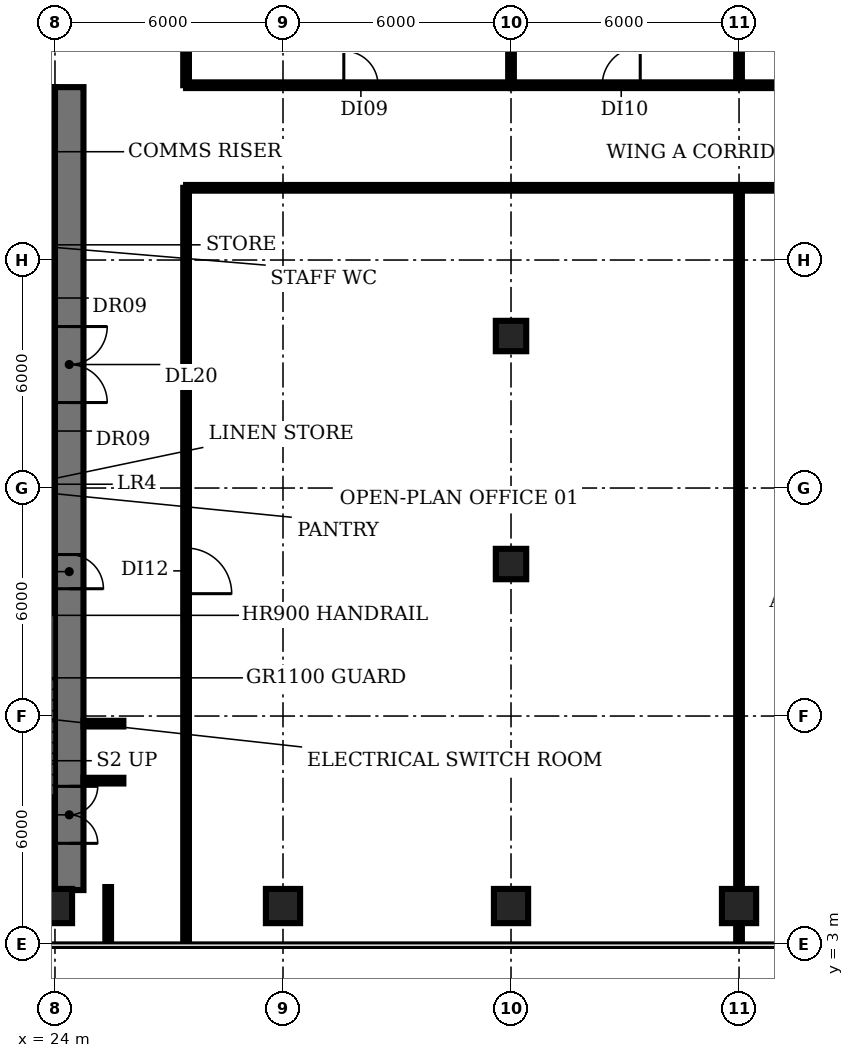
"""IFC4 building model, lengths in metres.
Left out: names, types, materials, properties, quantities, classifications, styles, units other than length and angle.
Written with IfcOpenShell. Run it as: python <this file> out.ifc"""

import sys

from ifc_helpers import new_model, si_unit, direction, frame, frame_2d, origin, origin_2d, place, context, subcontext, project, spatial, rectangle, extrude, element, fill, save


model = new_model("IFC4")
c1 = context("Model", 3, precision=1e-05, world=origin(), true_north=direction((0.0, 1.0)))
c2 = subcontext(c1, "Body", "Model", "MODEL_VIEW")
j1 = project(units=[si_unit("LENGTHUNIT", "METRE"), si_unit("PLANEANGLEUNIT", "RADIAN")], contexts=[c1])
p1 = place(None, origin())
s1 = spatial("IfcSite", under=j1, at=p1, CompositionType="ELEMENT")
p2 = place(p1, origin())
s2 = spatial("IfcBuilding", under=s1, at=p2, CompositionType="ELEMENT")
p3 = place(p2, frame((0.0, 0.0, 100.4)))
s3 = spatial("IfcBuildingStorey", under=s2, at=p3, CompositionType="ELEMENT", Elevation=100.4)
for number, where, z_axis, x_axis in (
    (1, (24.0, 4.0, 0.0), (0.0, 0.0, 1.0), (1.0, 0.0, 0.0)),
    (2, (30.0, 4.0, 0.0), (0.0, 0.0, 1.0), (1.0, 0.0, 0.0)),
    (3, (36.0, 4.0, 0.0), (0.0, 0.0, 1.0), (1.0, 0.0, 0.0)),
):
    element("IfcColumn", number, at=place(p3, frame(where, z_axis=z_axis, x_axis=x_axis)), inside=s3, PredefinedType="COLUMN", context=c2, shape_type="SweptSolid", body=[
        extrude(rectangle(XDim=0.9, YDim=0.9, at=origin_2d()), origin(), (0.0, 0.0, 1.0), 3.85),
    ])
for number, where, z_axis, x_axis in (
    (4, (36.0, 13.0, 0.0), (0.0, 0.0, 1.0), (1.0, 0.0, 0.0)),
    (5, (36.0, 19.0, 0.0), (0.0, 0.0, 1.0), (1.0, 0.0, 0.0)),
):
    element("IfcColumn", number, at=place(p3, frame(where, z_axis=z_axis, x_axis=x_axis)), inside=s3, PredefinedType="COLUMN", context=c2, shape_type="SweptSolid", body=[
        extrude(rectangle(XDim=0.8, YDim=0.8, at=origin_2d()), origin(), (0.0, 0.0, 1.0), 3.85),
    ])
p4 = place(p3, frame((42.0, 4.0, 0.0), z_axis=(0.0, 0.0, 1.0), x_axis=(1.0, 0.0, 0.0)))
e6 = element("IfcColumn", 6, at=p4, inside=s3, PredefinedType="COLUMN", context=c2, shape_type="SweptSolid", body=[
    extrude(rectangle(XDim=0.9, YDim=0.9, at=origin_2d()), origin(), (0.0, 0.0, 1.0), 3.85),
])
p5 = place(p3, frame((20.85, 11.825, 0.0), z_axis=(0.0, 0.0, 1.0), x_axis=(1.0, 0.0, 0.0)))
e7 = element("IfcWall", 7, at=p5, inside=s3, PredefinedType="SHEAR", context=c2, shape_type="SweptSolid", body=[
    extrude(rectangle(XDim=3.15, YDim=0.25, at=frame_2d((1.575, 0.0))), origin(), (0.0, 0.0, 1.0), 3.85),
])
p6 = place(p3, frame((16.6, 13.7, 0.0), z_axis=(0.0, 0.0, 1.0), x_axis=(1.0, 0.0, 0.0)))
e8 = element("IfcWall", 8, at=p6, inside=s3, PredefinedType="PARTITIONING", context=c2, shape_type="SweptSolid", body=[
    extrude(rectangle(XDim=7.4, YDim=0.225, at=frame_2d((3.7, 0.0))), origin(), (0.0, 0.0, 1.0), 3.85),
])
p7 = place(p3, frame((9.4, 16.5, 0.0), z_axis=(0.0, 0.0, 1.0), x_axis=(1.0, 0.0, 0.0)))
e9 = element("IfcWall", 9, at=p7, inside=s3, PredefinedType="PARTITIONING", context=c2, shape_type="SweptSolid", body=[
    extrude(rectangle(XDim=14.6, YDim=0.225, at=frame_2d((7.3, 0.0))), origin(), (0.0, 0.0, 1.0), 3.85),
])
p8 = place(p7, frame((0.75, 0.0, 0.0)))
e10 = element("IfcOpeningElement", 10, at=p8, cuts=e9, PredefinedType="OPENING", context=c2, shape_type="SweptSolid", body=[
    extrude(rectangle(XDim=1.1, YDim=2.1, at=frame_2d((0.55, 1.05))), frame((0.0, 0.123, 0.0), z_axis=(0.0, -1.0, 0.0), x_axis=(1.0, 0.0, 0.0)), (0.0, 0.0, 1.0), 0.245),
])
p9 = place(p7, frame((3.55, 0.0, 0.0)))
e11 = element("IfcOpeningElement", 11, at=p9, cuts=e9, PredefinedType="OPENING", context=c2, shape_type="SweptSolid", body=[
    extrude(rectangle(XDim=1.1, YDim=2.1, at=frame_2d((0.55, 1.05))), frame((0.0, 0.123, 0.0), z_axis=(0.0, -1.0, 0.0), x_axis=(1.0, 0.0, 0.0)), (0.0, 0.0, 1.0), 0.245),
])
p10 = place(p7, frame((6.35, 0.0, 0.0)))
e12 = element("IfcOpeningElement", 12, at=p10, cuts=e9, PredefinedType="OPENING", context=c2, shape_type="SweptSolid", body=[
    extrude(rectangle(XDim=1.1, YDim=2.1, at=frame_2d((0.55, 1.05))), frame((0.0, 0.123, 0.0), z_axis=(0.0, -1.0, 0.0), x_axis=(1.0, 0.0, 0.0)), (0.0, 0.0, 1.0), 0.245),
])
p11 = place(p7, frame((9.15, 0.0, 0.0)))
e13 = element("IfcOpeningElement", 13, at=p11, cuts=e9, PredefinedType="OPENING", context=c2, shape_type="SweptSolid", body=[
    extrude(rectangle(XDim=1.1, YDim=2.1, at=frame_2d((0.55, 1.05))), frame((0.0, 0.123, 0.0), z_axis=(0.0, -1.0, 0.0), x_axis=(1.0, 0.0, 0.0)), (0.0, 0.0, 1.0), 0.245),
])
p12 = place(p7, frame((11.647, 0.0, 0.0)))
e14 = element("IfcOpeningElement", 14, at=p12, cuts=e9, PredefinedType="OPENING", context=c2, shape_type="SweptSolid", body=[
    extrude(rectangle(XDim=0.9, YDim=2.1, at=frame_2d((0.45, 1.05))), frame((0.0, 0.123, 0.0), z_axis=(0.0, -1.0, 0.0), x_axis=(1.0, 0.0, 0.0)), (0.0, 0.0, 1.0), 0.245),
])
p13 = place(p7, frame((13.423, 0.0, 0.0)))
e15 = element("IfcOpeningElement", 15, at=p13, cuts=e9, PredefinedType="OPENING", context=c2, shape_type="SweptSolid", body=[
    extrude(rectangle(XDim=0.9, YDim=2.1, at=frame_2d((0.45, 1.05))), frame((0.0, 0.123, 0.0), z_axis=(0.0, -1.0, 0.0), x_axis=(1.0, 0.0, 0.0)), (0.0, 0.0, 1.0), 0.245),
])
p14 = place(p3, frame((24.0, 20.0, 0.0), z_axis=(0.0, 0.0, 1.0), x_axis=(-1.0, 0.0, 0.0)))
e16 = element("IfcWall", 16, at=p14, inside=s3, PredefinedType="PARTITIONING", context=c2, shape_type="SweptSolid", body=[
    extrude(rectangle(XDim=14.6, YDim=0.225, at=frame_2d((7.3, 0.0))), origin(), (0.0, 0.0, 1.0), 3.85),
])
p15 = place(p14, frame((12.9, 0.0, 0.0)))
e17 = element("IfcOpeningElement", 17, at=p15, cuts=e16, PredefinedType="OPENING", context=c2, shape_type="SweptSolid", body=[
    extrude(rectangle(XDim=0.9, YDim=2.1, at=frame_2d((0.45, 1.05))), frame((0.0, 0.123, 0.0), z_axis=(0.0, -1.0, 0.0), x_axis=(1.0, 0.0, 0.0)), (0.0, 0.0, 1.0), 0.245),
])
p16 = place(p14, frame((9.475, 0.0, 0.0)))
e18 = element("IfcOpeningElement", 18, at=p16, cuts=e16, PredefinedType="OPENING", context=c2, shape_type="SweptSolid", body=[
    extrude(rectangle(XDim=1.0, YDim=2.1, at=frame_2d((0.5, 1.05))), frame((0.0, 0.123, 0.0), z_axis=(0.0, -1.0, 0.0), x_axis=(1.0, 0.0, 0.0)), (0.0, 0.0, 1.0), 0.245),
])
p17 = place(p14, frame((6.375, 0.0, 0.0)))
e19 = element("IfcOpeningElement", 19, at=p17, cuts=e16, PredefinedType="OPENING", context=c2, shape_type="SweptSolid", body=[
    extrude(rectangle(XDim=0.9, YDim=2.1, at=frame_2d((0.45, 1.05))), frame((0.0, 0.123, 0.0), z_axis=(0.0, -1.0, 0.0), x_axis=(1.0, 0.0, 0.0)), (0.0, 0.0, 1.0), 0.245),
])
p18 = place(p14, frame((4.175, 0.0, 0.0)))
e20 = element("IfcOpeningElement", 20, at=p18, cuts=e16, PredefinedType="OPENING", context=c2, shape_type="SweptSolid", body=[
    extrude(rectangle(XDim=0.9, YDim=2.1, at=frame_2d((0.45, 1.05))), frame((0.0, 0.123, 0.0), z_axis=(0.0, -1.0, 0.0), x_axis=(1.0, 0.0, 0.0)), (0.0, 0.0, 1.0), 0.245),
])
p19 = place(p14, frame((2.137, 0.0, 0.0)))
e21 = element("IfcOpeningElement", 21, at=p19, cuts=e16, PredefinedType="OPENING", context=c2, shape_type="SweptSolid", body=[
    extrude(rectangle(XDim=0.9, YDim=2.1, at=frame_2d((0.45, 1.05))), frame((0.0, 0.123, 0.0), z_axis=(0.0, -1.0, 0.0), x_axis=(1.0, 0.0, 0.0)), (0.0, 0.0, 1.0), 0.245),
])
p20 = place(p14, frame((0.363, 0.0, 0.0)))
e22 = element("IfcOpeningElement", 22, at=p20, cuts=e16, PredefinedType="OPENING", context=c2, shape_type="SweptSolid", body=[
    extrude(rectangle(XDim=0.9, YDim=2.1, at=frame_2d((0.45, 1.05))), frame((0.0, 0.123, 0.0), z_axis=(0.0, -1.0, 0.0), x_axis=(1.0, 0.0, 0.0)), (0.0, 0.0, 1.0), 0.245),
])
p21 = place(p3, frame((9.4, 22.8, 0.0), z_axis=(0.0, 0.0, 1.0), x_axis=(1.0, 0.0, 0.0)))
e23 = element("IfcWall", 23, at=p21, inside=s3, PredefinedType="PARTITIONING", context=c2, shape_type="SweptSolid", body=[
    extrude(rectangle(XDim=14.6, YDim=0.225, at=frame_2d((7.3, 0.0))), origin(), (0.0, 0.0, 1.0), 3.85),
])
p22 = place(p3, frame((24.375, 25.55, 0.0), z_axis=(0.0, 0.0, 1.0), x_axis=(0.0, -1.0, 0.0)))
e24 = element("IfcWall", 24, at=p22, inside=s3, PredefinedType="SHEAR", context=c2, shape_type="SweptSolid", body=[
    extrude(rectangle(XDim=21.13, YDim=0.75, at=frame_2d((10.565, 0.0))), origin(), (0.0, 0.0, 1.0), 3.85),
])
p23 = place(p22, frame((18.4, 0.0, 0.0)))
e25 = element("IfcOpeningElement", 25, at=p23, cuts=e24, PredefinedType="OPENING", context=c2, shape_type="SweptSolid", body=[
    extrude(rectangle(XDim=1.5, YDim=2.1, at=frame_2d((0.75, 1.05))), frame((0.0, 0.385, 0.0), z_axis=(0.0, -1.0, 0.0), x_axis=(1.0, 0.0, 0.0)), (0.0, 0.0, 1.0), 0.77),
])
p24 = place(p22, frame((12.3, 0.0, 0.0)))
e26 = element("IfcOpeningElement", 26, at=p24, cuts=e24, PredefinedType="OPENING", context=c2, shape_type="SweptSolid", body=[
    extrude(rectangle(XDim=0.9, YDim=2.1, at=frame_2d((0.45, 1.05))), frame((0.0, 0.385, 0.0), z_axis=(0.0, -1.0, 0.0), x_axis=(1.0, 0.0, 0.0)), (0.0, 0.0, 1.0), 0.77),
])
p25 = place(p22, frame((6.3, 0.0, 0.0)))
e27 = element("IfcOpeningElement", 27, at=p25, cuts=e24, PredefinedType="OPENING", context=c2, shape_type="SweptSolid", body=[
    extrude(rectangle(XDim=2.0, YDim=2.1, at=frame_2d((1.0, 1.05))), frame((0.0, 0.385, 0.0), z_axis=(0.0, -1.0, 0.0), x_axis=(1.0, 0.0, 0.0)), (0.0, 0.0, 1.0), 0.77),
])
p26 = place(p3, frame((24.0, 5.025, 0.0), z_axis=(0.0, 0.0, 1.0), x_axis=(-1.0, 0.0, 0.0)))
e28 = element("IfcWall", 28, at=p26, inside=s3, PredefinedType="SHEAR", context=c2, shape_type="SweptSolid", body=[
    extrude(rectangle(XDim=18.0, YDim=0.75, at=frame_2d((9.0, 0.0))), origin(), (0.0, 0.0, 1.0), 3.85),
])
p27 = place(p26, frame((0.825, 0.0, 0.0)))
e29 = element("IfcOpeningElement", 29, at=p27, cuts=e28, PredefinedType="OPENING", context=c2, shape_type="SweptSolid", body=[
    extrude(rectangle(XDim=1.5, YDim=2.1, at=frame_2d((0.75, 1.05))), frame((0.0, 0.385, 0.0), z_axis=(0.0, -1.0, 0.0), x_axis=(1.0, 0.0, 0.0)), (0.0, 0.0, 1.0), 0.77),
])
p28 = place(p26, frame((15.675, 0.0, 0.0)))
e30 = element("IfcOpeningElement", 30, at=p28, cuts=e28, PredefinedType="OPENING", context=c2, shape_type="SweptSolid", body=[
    extrude(rectangle(XDim=1.5, YDim=2.1, at=frame_2d((0.75, 1.05))), frame((0.0, 0.385, 0.0), z_axis=(0.0, -1.0, 0.0), x_axis=(1.0, 0.0, 0.0)), (0.0, 0.0, 1.0), 0.77),
])
p29 = place(p26, frame((13.0, 0.0, 0.0)))
e31 = element("IfcOpeningElement", 31, at=p29, cuts=e28, PredefinedType="OPENING", context=c2, shape_type="SweptSolid", body=[
    extrude(rectangle(XDim=1.2, YDim=2.1, at=frame_2d((0.6, 1.05))), frame((0.0, 0.385, 0.0), z_axis=(0.0, -1.0, 0.0), x_axis=(1.0, 0.0, 0.0)), (0.0, 0.0, 1.0), 0.77),
])
p30 = place(p26, frame((4.35, 0.0, 0.0)))
e32 = element("IfcOpeningElement", 32, at=p30, cuts=e28, PredefinedType="OPENING", context=c2, shape_type="SweptSolid", body=[
    extrude(rectangle(XDim=1.0, YDim=2.1, at=frame_2d((0.5, 1.05))), frame((0.0, 0.385, 0.0), z_axis=(0.0, -1.0, 0.0), x_axis=(1.0, 0.0, 0.0)), (0.0, 0.0, 1.0), 0.77),
])
p31 = place(p3, frame((6.0, 25.175, 0.0), z_axis=(0.0, 0.0, 1.0), x_axis=(1.0, 0.0, 0.0)))
e33 = element("IfcWall", 33, at=p31, inside=s3, PredefinedType="SHEAR", context=c2, shape_type="SweptSolid", body=[
    extrude(rectangle(XDim=18.0, YDim=0.75, at=frame_2d((9.0, 0.0))), origin(), (0.0, 0.0, 1.0), 3.85),
])
for number, where, z_axis, x_axis in (
    (34, (24.75, 7.3, 0.0), (0.0, 0.0, 1.0), (1.0, 0.0, 0.0)),
    (35, (24.75, 8.8, 0.0), (0.0, 0.0, 1.0), (1.0, 0.0, 0.0)),
):
    element("IfcWall", number, at=place(p3, frame(where, z_axis=z_axis, x_axis=x_axis)), inside=s3, PredefinedType="PARTITIONING", context=c2, shape_type="SweptSolid", body=[
        extrude(rectangle(XDim=1.05, YDim=0.15, at=frame_2d((0.525, 0.0))), origin(), (0.0, 0.0, 1.0), 2.83),
    ])
p32 = place(p3, frame((25.4, 3.02, 0.0), z_axis=(0.0, 0.0, 1.0), x_axis=(0.0, 1.0, 0.0)))
e36 = element("IfcWall", 36, at=p32, inside=s3, PredefinedType="PARTITIONING", context=c2, shape_type="SweptSolid", body=[
    extrude(rectangle(XDim=1.48, YDim=0.15, at=frame_2d((0.74, 0.0))), origin(), (0.0, 0.0, 1.0), 2.83),
])
p33 = place(p3, frame((27.45, 22.9, 0.0), z_axis=(0.0, 0.0, 1.0), x_axis=(0.0, -1.0, 0.0)))
e37 = element("IfcWall", 37, at=p33, inside=s3, PredefinedType="PARTITIONING", context=c2, shape_type="SweptSolid", body=[
    extrude(rectangle(XDim=19.88, YDim=0.15, at=frame_2d((9.94, 0.0))), origin(), (0.0, 0.0, 1.0), 2.83),
])
p34 = place(p33, frame((9.48, 0.0, 0.0)))
e38 = element("IfcOpeningElement", 38, at=p34, cuts=e37, PredefinedType="OPENING", context=c2, shape_type="SweptSolid", body=[
    extrude(rectangle(XDim=1.2, YDim=2.1, at=frame_2d((0.6, 1.05))), frame((0.0, 0.085, 0.0), z_axis=(0.0, -1.0, 0.0), x_axis=(1.0, 0.0, 0.0)), (0.0, 0.0, 1.0), 0.17),
])
p35 = place(p3, frame((27.45, 22.9, 0.0), z_axis=(0.0, 0.0, 1.0), x_axis=(1.0, 0.0, 0.0)))
e39 = element("IfcWall", 39, at=p35, inside=s3, PredefinedType="PARTITIONING", context=c2, shape_type="SweptSolid", body=[
    extrude(rectangle(XDim=14.55, YDim=0.15, at=frame_2d((7.275, 0.0))), origin(), (0.0, 0.0, 1.0), 2.83),
])
p36 = place(p3, frame((27.45, 25.6, 0.0), z_axis=(0.0, 0.0, 1.0), x_axis=(0.0, 1.0, 0.0)))
e40 = element("IfcWall", 40, at=p36, inside=s3, PredefinedType="PARTITIONING", context=c2, shape_type="SweptSolid", body=[
    extrude(rectangle(XDim=3.85, YDim=0.15, at=frame_2d((1.925, 0.0))), origin(), (0.0, 0.0, 1.0), 2.83),
])
p37 = place(p3, frame((27.45, 25.6, 0.0), z_axis=(0.0, 0.0, 1.0), x_axis=(1.0, 0.0, 0.0)))
e41 = element("IfcWall", 41, at=p37, inside=s3, PredefinedType="PARTITIONING", context=c2, shape_type="SweptSolid", body=[
    extrude(rectangle(XDim=8.55, YDim=0.15, at=frame_2d((4.275, 0.0))), origin(), (0.0, 0.0, 1.0), 2.83),
])
p38 = place(p37, frame((4.15, 0.0, 0.0)))
e42 = element("IfcOpeningElement", 42, at=p38, cuts=e41, PredefinedType="OPENING", context=c2, shape_type="SweptSolid", body=[
    extrude(rectangle(XDim=0.9, YDim=2.1, at=frame_2d((0.45, 1.05))), frame((0.0, 0.085, 0.0), z_axis=(0.0, -1.0, 0.0), x_axis=(1.0, 0.0, 0.0)), (0.0, 0.0, 1.0), 0.17),
])
p39 = place(p3, frame((36.0, 25.6, 0.0), z_axis=(0.0, 0.0, 1.0), x_axis=(0.0, 1.0, 0.0)))
e43 = element("IfcWall", 43, at=p39, inside=s3, PredefinedType="PARTITIONING", context=c2, shape_type="SweptSolid", body=[
    extrude(rectangle(XDim=3.96, YDim=0.15, at=frame_2d((1.98, 0.0))), origin(), (0.0, 0.0, 1.0), 2.83),
])
p40 = place(p3, frame((36.0, 25.6, 0.0), z_axis=(0.0, 0.0, 1.0), x_axis=(1.0, 0.0, 0.0)))
e44 = element("IfcWall", 44, at=p40, inside=s3, PredefinedType="PARTITIONING", context=c2, shape_type="SweptSolid", body=[
    extrude(rectangle(XDim=6.0, YDim=0.15, at=frame_2d((3.0, 0.0))), origin(), (0.0, 0.0, 1.0), 2.83),
])
p41 = place(p40, frame((2.4, 0.0, 0.0)))
e45 = element("IfcOpeningElement", 45, at=p41, cuts=e44, PredefinedType="OPENING", context=c2, shape_type="SweptSolid", body=[
    extrude(rectangle(XDim=1.0, YDim=2.1, at=frame_2d((0.5, 1.05))), frame((0.0, 0.085, 0.0), z_axis=(0.0, -1.0, 0.0), x_axis=(1.0, 0.0, 0.0)), (0.0, 0.0, 1.0), 0.17),
])
p42 = place(p3, frame((42.0, 3.02, 0.0), z_axis=(0.0, 0.0, 1.0), x_axis=(0.0, 1.0, 0.0)))
e46 = element("IfcWall", 46, at=p42, inside=s3, PredefinedType="PARTITIONING", context=c2, shape_type="SweptSolid", body=[
    extrude(rectangle(XDim=19.88, YDim=0.15, at=frame_2d((9.94, 0.0))), origin(), (0.0, 0.0, 1.0), 2.83),
])
p43 = place(p3, frame((42.0, 25.6, 0.0), z_axis=(0.0, 0.0, 1.0), x_axis=(0.0, 1.0, 0.0)))
e47 = element("IfcWall", 47, at=p43, inside=s3, PredefinedType="PARTITIONING", context=c2, shape_type="SweptSolid", body=[
    extrude(rectangle(XDim=4.22, YDim=0.15, at=frame_2d((2.11, 0.0))), origin(), (0.0, 0.0, 1.0), 2.83),
])
p44 = place(p3, frame((42.0, 25.6, 0.0), z_axis=(0.0, 0.0, 1.0), x_axis=(1.0, 0.0, 0.0)))
e48 = element("IfcWall", 48, at=p44, inside=s3, PredefinedType="PARTITIONING", context=c2, shape_type="SweptSolid", body=[
    extrude(rectangle(XDim=6.0, YDim=0.15, at=frame_2d((3.0, 0.0))), origin(), (0.0, 0.0, 1.0), 2.83),
])
p45 = place(p44, frame((2.4, 0.0, 0.0)))
e49 = element("IfcOpeningElement", 49, at=p45, cuts=e48, PredefinedType="OPENING", context=c2, shape_type="SweptSolid", body=[
    extrude(rectangle(XDim=1.0, YDim=2.1, at=frame_2d((0.5, 1.05))), frame((0.0, 0.085, 0.0), z_axis=(0.0, -1.0, 0.0), x_axis=(1.0, 0.0, 0.0)), (0.0, 0.0, 1.0), 0.17),
])
p46 = place(p3, frame((48.0, 22.9, 0.0), z_axis=(0.0, 0.0, 1.0), x_axis=(-1.0, 0.0, 0.0)))
e50 = element("IfcWall", 50, at=p46, inside=s3, PredefinedType="PARTITIONING", context=c2, shape_type="SweptSolid", body=[
    extrude(rectangle(XDim=6.0, YDim=0.15, at=frame_2d((3.0, 0.0))), origin(), (0.0, 0.0, 1.0), 2.83),
])
p47 = place(p46, frame((2.5, 0.0, 0.0)))
e51 = element("IfcOpeningElement", 51, at=p47, cuts=e50, PredefinedType="OPENING", context=c2, shape_type="SweptSolid", body=[
    extrude(rectangle(XDim=0.9, YDim=2.1, at=frame_2d((0.45, 1.05))), frame((0.0, 0.085, 0.0), z_axis=(0.0, -1.0, 0.0), x_axis=(1.0, 0.0, 0.0)), (0.0, 0.0, 1.0), 0.17),
])
p48 = place(p23, origin())
e52 = element("IfcDoor", 52, at=p48, inside=s3, OperationType="DOUBLE_DOOR_SINGLE_SWING", PredefinedType="DOOR", context=c2, shape_type="SweptSolid", body=[
    extrude(rectangle(XDim=1.5, YDim=2.1, at=frame_2d((0.75, 1.05))), frame((0.0, 0.025, 0.0), z_axis=(0.0, -1.0, 0.0), x_axis=(1.0, 0.0, 0.0)), (0.0, 0.0, 1.0), 0.05),
])
fill(e25, e52)
p49 = place(p24, origin())
e53 = element("IfcDoor", 53, at=p49, inside=s3, OperationType="SINGLE_SWING_RIGHT", PredefinedType="DOOR", context=c2, shape_type="SweptSolid", body=[
    extrude(rectangle(XDim=0.9, YDim=2.1, at=frame_2d((0.45, 1.05))), frame((0.0, -0.315, 0.0), z_axis=(0.0, -1.0, 0.0), x_axis=(1.0, 0.0, 0.0)), (0.0, 0.0, 1.0), 0.05),
])
fill(e26, e53)
p50 = place(p25, origin())
e54 = element("IfcDoor", 54, at=p50, inside=s3, OperationType="DOUBLE_DOOR_SINGLE_SWING", PredefinedType="DOOR", context=c2, shape_type="SweptSolid", body=[
    extrude(rectangle(XDim=2.0, YDim=2.1, at=frame_2d((1.0, 1.05))), frame((0.0, 0.025, 0.0), z_axis=(0.0, -1.0, 0.0), x_axis=(1.0, 0.0, 0.0)), (0.0, 0.0, 1.0), 0.05),
])
fill(e27, e54)
p51 = place(p34, origin())
e55 = element("IfcDoor", 55, at=p51, inside=s3, OperationType="SINGLE_SWING_RIGHT", PredefinedType="DOOR", context=c2, shape_type="SweptSolid", body=[
    extrude(rectangle(XDim=1.2, YDim=2.1, at=frame_2d((0.6, 1.05))), frame((0.0, 0.025, 0.0), z_axis=(0.0, -1.0, 0.0), x_axis=(1.0, 0.0, 0.0)), (0.0, 0.0, 1.0), 0.05),
])
fill(e38, e55)
p52 = place(p38, origin())
e56 = element("IfcDoor", 56, at=p52, inside=s3, OperationType="SINGLE_SWING_LEFT", PredefinedType="DOOR", context=c2, shape_type="SweptSolid", body=[
    extrude(rectangle(XDim=0.9, YDim=2.1, at=frame_2d((0.45, 1.05))), frame((0.0, 0.025, 0.0), z_axis=(0.0, -1.0, 0.0), x_axis=(1.0, 0.0, 0.0)), (0.0, 0.0, 1.0), 0.05),
])
fill(e42, e56)
p53 = place(p41, origin())
e57 = element("IfcDoor", 57, at=p53, inside=s3, OperationType="SINGLE_SWING_RIGHT", PredefinedType="DOOR", context=c2, shape_type="SweptSolid", body=[
    extrude(rectangle(XDim=1.0, YDim=2.1, at=frame_2d((0.5, 1.05))), frame((0.0, 0.025, 0.0), z_axis=(0.0, -1.0, 0.0), x_axis=(1.0, 0.0, 0.0)), (0.0, 0.0, 1.0), 0.05),
])
fill(e45, e57)
save(model, sys.argv[1])
